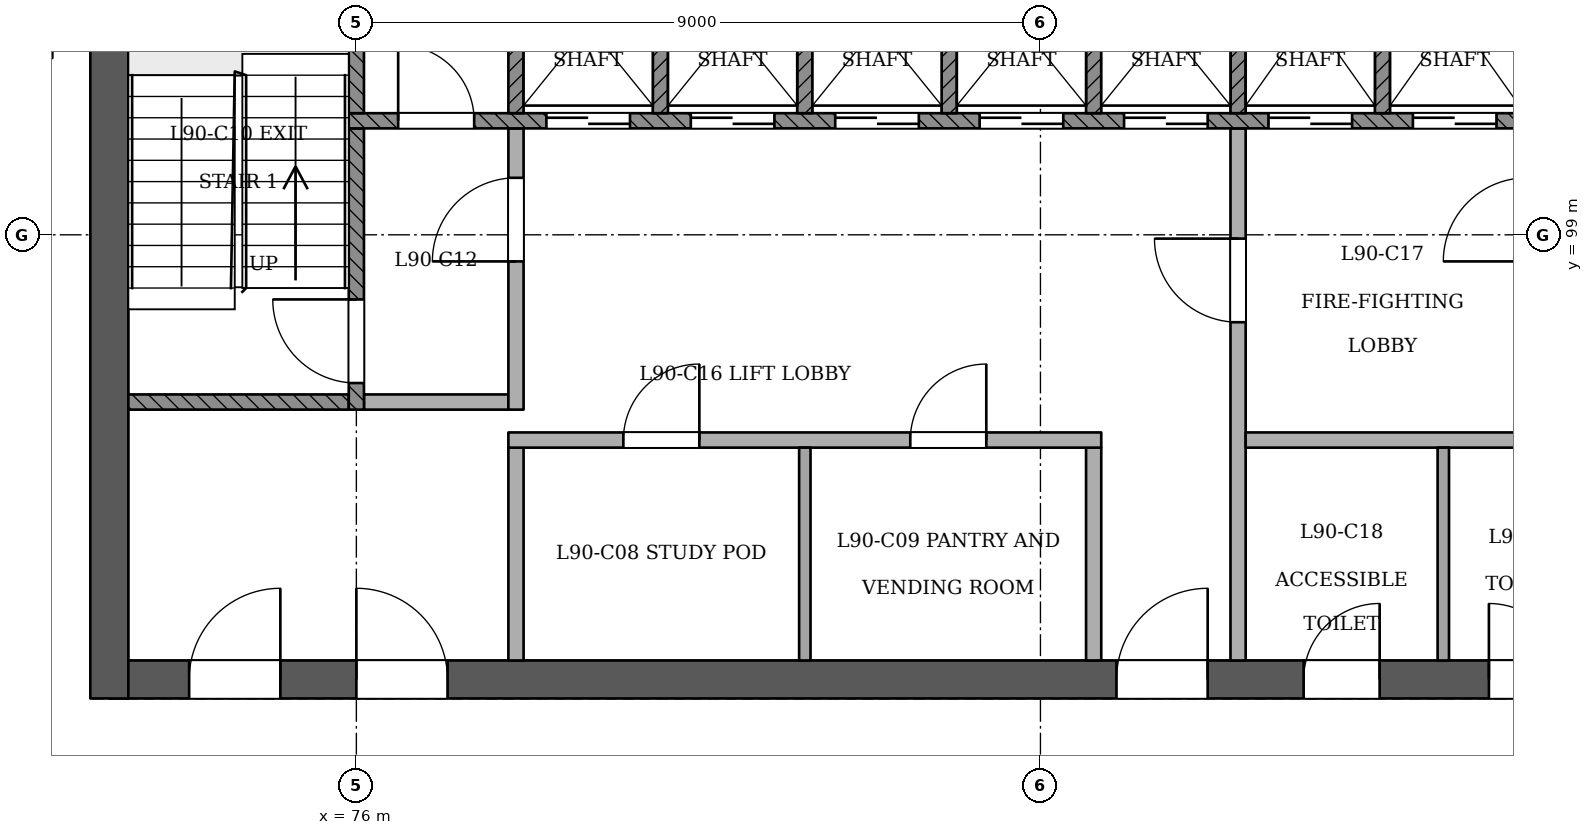
"""IFC4 building model, lengths in metres.
Left out: names, types, materials, properties, quantities, classifications, styles, units other than length and angle.
Written with IfcOpenShell. Run it as: python <this file> out.ifc"""

import sys

from ifc_helpers import new_model, si_unit, direction, frame, frame_2d, origin, place, context, subcontext, project, spatial, rectangle, extrude, element, fill, save


model = new_model("IFC4")
c1 = context("Model", 3, precision=1e-05, world=origin(), true_north=direction((0.0, 1.0)))
c2 = subcontext(c1, "Body", "Model", "MODEL_VIEW")
j1 = project(units=[si_unit("LENGTHUNIT", "METRE"), si_unit("PLANEANGLEUNIT", "RADIAN")], contexts=[c1])
p1 = place(None, origin())
s1 = spatial("IfcSite", under=j1, at=p1, CompositionType="ELEMENT")
p2 = place(p1, origin())
s2 = spatial("IfcBuilding", under=s1, at=p2, CompositionType="ELEMENT")
p3 = place(p2, frame((0.0, 0.0, 347.2)))
s3 = spatial("IfcBuildingStorey", under=s2, at=p3, CompositionType="ELEMENT", Elevation=347.2)
p4 = place(p3, frame((72.75, 93.15, 0.0), z_axis=(0.0, 0.0, 1.0), x_axis=(1.0, 0.0, 0.0)))
e1 = element("IfcWall", 1, at=p4, inside=s3, PredefinedType="SHEAR", context=c2, shape_type="SweptSolid", body=[
    extrude(rectangle(XDim=24.75, YDim=0.5, at=frame_2d((12.375, 0.0))), origin(), (0.0, 0.0, 1.0), 3.6),
])
p5 = place(p4, frame((1.05, 0.0, 0.0)))
e2 = element("IfcOpeningElement", 2, at=p5, cuts=e1, PredefinedType="OPENING", context=c2, shape_type="SweptSolid", body=[
    extrude(rectangle(XDim=1.2, YDim=2.1, at=frame_2d((0.6, 1.05))), frame((0.0, 0.26, 0.0), z_axis=(0.0, -1.0, 0.0), x_axis=(1.0, 0.0, 0.0)), (0.0, 0.0, 1.0), 0.521),
])
p6 = place(p4, frame((3.25, 0.0, 0.0)))
e3 = element("IfcOpeningElement", 3, at=p6, cuts=e1, PredefinedType="OPENING", context=c2, shape_type="SweptSolid", body=[
    extrude(rectangle(XDim=1.2, YDim=2.1, at=frame_2d((0.6, 1.05))), frame((0.0, 0.26, 0.0), z_axis=(0.0, -1.0, 0.0), x_axis=(1.0, 0.0, 0.0)), (0.0, 0.0, 1.0), 0.521),
])
p7 = place(p4, frame((13.25, 0.0, 0.0)))
e4 = element("IfcOpeningElement", 4, at=p7, cuts=e1, PredefinedType="OPENING", context=c2, shape_type="SweptSolid", body=[
    extrude(rectangle(XDim=1.2, YDim=2.1, at=frame_2d((0.6, 1.05))), frame((0.0, 0.26, 0.0), z_axis=(0.0, -1.0, 0.0), x_axis=(1.0, 0.0, 0.0)), (0.0, 0.0, 1.0), 0.521),
])
p8 = place(p4, frame((15.712, 0.0, 0.0)))
e5 = element("IfcOpeningElement", 5, at=p8, cuts=e1, PredefinedType="OPENING", context=c2, shape_type="SweptSolid", body=[
    extrude(rectangle(XDim=1.0, YDim=2.1, at=frame_2d((0.5, 1.05))), frame((0.0, 0.26, 0.0), z_axis=(0.0, -1.0, 0.0), x_axis=(1.0, 0.0, 0.0)), (0.0, 0.0, 1.0), 0.521),
])
p9 = place(p4, frame((18.15, 0.0, 0.0)))
e6 = element("IfcOpeningElement", 6, at=p9, cuts=e1, PredefinedType="OPENING", context=c2, shape_type="SweptSolid", body=[
    extrude(rectangle(XDim=1.0, YDim=2.1, at=frame_2d((0.5, 1.05))), frame((0.0, 0.26, 0.0), z_axis=(0.0, -1.0, 0.0), x_axis=(1.0, 0.0, 0.0)), (0.0, 0.0, 1.0), 0.521),
])
p10 = place(p4, frame((20.5, 0.0, 0.0)))
e7 = element("IfcOpeningElement", 7, at=p10, cuts=e1, PredefinedType="OPENING", context=c2, shape_type="SweptSolid", body=[
    extrude(rectangle(XDim=1.0, YDim=2.1, at=frame_2d((0.5, 1.05))), frame((0.0, 0.26, 0.0), z_axis=(0.0, -1.0, 0.0), x_axis=(1.0, 0.0, 0.0)), (0.0, 0.0, 1.0), 0.521),
])
p11 = place(p4, frame((22.788, 0.0, 0.0)))
e8 = element("IfcOpeningElement", 8, at=p11, cuts=e1, PredefinedType="OPENING", context=c2, shape_type="SweptSolid", body=[
    extrude(rectangle(XDim=1.0, YDim=2.1, at=frame_2d((0.5, 1.05))), frame((0.0, 0.26, 0.0), z_axis=(0.0, -1.0, 0.0), x_axis=(1.0, 0.0, 0.0)), (0.0, 0.0, 1.0), 0.521),
])
p12 = place(p3, frame((72.75, 103.65, 0.0), z_axis=(0.0, 0.0, 1.0), x_axis=(0.0, -1.0, 0.0)))
e9 = element("IfcWall", 9, at=p12, inside=s3, PredefinedType="SHEAR", context=c2, shape_type="SweptSolid", body=[
    extrude(rectangle(XDim=10.75, YDim=0.5, at=frame_2d((5.375, 0.0))), origin(), (0.0, 0.0, 1.0), 3.6),
])
p13 = place(p3, frame((78.1, 93.4, 0.0), z_axis=(0.0, 0.0, 1.0), x_axis=(0.0, 1.0, 0.0)))
e10 = element("IfcWall", 10, at=p13, inside=s3, PredefinedType="PARTITIONING", context=c2, shape_type="SweptSolid", body=[
    extrude(rectangle(XDim=2.8, YDim=0.2, at=frame_2d((1.4, 0.0))), origin(), (0.0, 0.0, 1.0), 3.2),
])
p14 = place(p3, frame((81.9, 93.4, 0.0), z_axis=(0.0, 0.0, 1.0), x_axis=(0.0, 1.0, 0.0)))
e11 = element("IfcWall", 11, at=p14, inside=s3, PredefinedType="PARTITIONING", context=c2, shape_type="SweptSolid", body=[
    extrude(rectangle(XDim=2.8, YDim=0.15, at=frame_2d((1.4, 0.0))), origin(), (0.0, 0.0, 1.0), 3.2),
])
p15 = place(p3, frame((85.7, 93.4, 0.0), z_axis=(0.0, 0.0, 1.0), x_axis=(0.0, 1.0, 0.0)))
e12 = element("IfcWall", 12, at=p15, inside=s3, PredefinedType="PARTITIONING", context=c2, shape_type="SweptSolid", body=[
    extrude(rectangle(XDim=2.8, YDim=0.2, at=frame_2d((1.4, 0.0))), origin(), (0.0, 0.0, 1.0), 3.2),
])
p16 = place(p3, frame((87.6, 93.4, 0.0), z_axis=(0.0, 0.0, 1.0), x_axis=(0.0, 1.0, 0.0)))
e13 = element("IfcWall", 13, at=p16, inside=s3, PredefinedType="PARTITIONING", context=c2, shape_type="SweptSolid", body=[
    extrude(rectangle(XDim=7.0, YDim=0.2, at=frame_2d((3.5, 0.0))), origin(), (0.0, 0.0, 1.0), 3.2),
])
p17 = place(p16, frame((4.45, 0.0, 0.0)))
e14 = element("IfcOpeningElement", 14, at=p17, cuts=e13, PredefinedType="OPENING", context=c2, shape_type="SweptSolid", body=[
    extrude(rectangle(XDim=1.1, YDim=2.1, at=frame_2d((0.55, 1.05))), frame((0.0, 0.11, 0.0), z_axis=(0.0, -1.0, 0.0), x_axis=(1.0, 0.0, 0.0)), (0.0, 0.0, 1.0), 0.221),
])
p18 = place(p3, frame((90.3, 93.4, 0.0), z_axis=(0.0, 0.0, 1.0), x_axis=(0.0, 1.0, 0.0)))
e15 = element("IfcWall", 15, at=p18, inside=s3, PredefinedType="PARTITIONING", context=c2, shape_type="SweptSolid", body=[
    extrude(rectangle(XDim=2.8, YDim=0.15, at=frame_2d((1.4, 0.0))), origin(), (0.0, 0.0, 1.0), 3.2),
])
p19 = place(p3, frame((78.0, 96.3, 0.0), z_axis=(0.0, 0.0, 1.0), x_axis=(1.0, 0.0, 0.0)))
e16 = element("IfcWall", 16, at=p19, inside=s3, PredefinedType="PARTITIONING", context=c2, shape_type="SweptSolid", body=[
    extrude(rectangle(XDim=7.8, YDim=0.2, at=frame_2d((3.9, 0.0))), origin(), (0.0, 0.0, 1.0), 3.2),
])
p20 = place(p19, frame((1.512, 0.0, 0.0)))
e17 = element("IfcOpeningElement", 17, at=p20, cuts=e16, PredefinedType="OPENING", context=c2, shape_type="SweptSolid", body=[
    extrude(rectangle(XDim=1.0, YDim=2.1, at=frame_2d((0.5, 1.05))), frame((0.0, 0.11, 0.0), z_axis=(0.0, -1.0, 0.0), x_axis=(1.0, 0.0, 0.0)), (0.0, 0.0, 1.0), 0.221),
])
p21 = place(p19, frame((5.288, 0.0, 0.0)))
e18 = element("IfcOpeningElement", 18, at=p21, cuts=e16, PredefinedType="OPENING", context=c2, shape_type="SweptSolid", body=[
    extrude(rectangle(XDim=1.0, YDim=2.1, at=frame_2d((0.5, 1.05))), frame((0.0, 0.11, 0.0), z_axis=(0.0, -1.0, 0.0), x_axis=(1.0, 0.0, 0.0)), (0.0, 0.0, 1.0), 0.221),
])
p22 = place(p3, frame((87.7, 96.3, 0.0), z_axis=(0.0, 0.0, 1.0), x_axis=(1.0, 0.0, 0.0)))
e19 = element("IfcWall", 19, at=p22, inside=s3, PredefinedType="PARTITIONING", context=c2, shape_type="SweptSolid", body=[
    extrude(rectangle(XDim=3.6, YDim=0.2, at=frame_2d((1.8, 0.0))), origin(), (0.0, 0.0, 1.0), 3.2),
])
p23 = place(p3, frame((73.0, 96.8, 0.0), z_axis=(0.0, 0.0, 1.0), x_axis=(1.0, 0.0, 0.0)))
e20 = element("IfcWall", 20, at=p23, inside=s3, PredefinedType="SOLIDWALL", context=c2, shape_type="SweptSolid", body=[
    extrude(rectangle(XDim=2.9, YDim=0.2, at=frame_2d((1.45, 0.0))), origin(), (0.0, 0.0, 1.0), 3.2),
])
p24 = place(p3, frame((76.0, 96.7, 0.0), z_axis=(0.0, 0.0, 1.0), x_axis=(0.0, 1.0, 0.0)))
e21 = element("IfcWall", 21, at=p24, inside=s3, PredefinedType="SOLIDWALL", context=c2, shape_type="SweptSolid", body=[
    extrude(rectangle(XDim=3.7, YDim=0.2, at=frame_2d((1.85, 0.0))), origin(), (0.0, 0.0, 1.0), 3.2),
])
p25 = place(p24, frame((0.35, 0.0, 0.0)))
e22 = element("IfcOpeningElement", 22, at=p25, cuts=e21, PredefinedType="OPENING", context=c2, shape_type="SweptSolid", body=[
    extrude(rectangle(XDim=1.1, YDim=2.1, at=frame_2d((0.55, 1.05))), frame((0.0, 0.11, 0.0), z_axis=(0.0, -1.0, 0.0), x_axis=(1.0, 0.0, 0.0)), (0.0, 0.0, 1.0), 0.221),
])
p26 = place(p3, frame((76.1, 96.8, 0.0), z_axis=(0.0, 0.0, 1.0), x_axis=(1.0, 0.0, 0.0)))
e23 = element("IfcWall", 23, at=p26, inside=s3, PredefinedType="PARTITIONING", context=c2, shape_type="SweptSolid", body=[
    extrude(rectangle(XDim=1.9, YDim=0.2, at=frame_2d((0.95, 0.0))), origin(), (0.0, 0.0, 1.0), 3.2),
])
p27 = place(p3, frame((78.1, 96.7, 0.0), z_axis=(0.0, 0.0, 1.0), x_axis=(0.0, 1.0, 0.0)))
e24 = element("IfcWall", 24, at=p27, inside=s3, PredefinedType="PARTITIONING", context=c2, shape_type="SweptSolid", body=[
    extrude(rectangle(XDim=3.7, YDim=0.2, at=frame_2d((1.85, 0.0))), origin(), (0.0, 0.0, 1.0), 3.2),
])
p28 = place(p27, frame((1.95, 0.0, 0.0)))
e25 = element("IfcOpeningElement", 25, at=p28, cuts=e24, PredefinedType="OPENING", context=c2, shape_type="SweptSolid", body=[
    extrude(rectangle(XDim=1.1, YDim=2.1, at=frame_2d((0.55, 1.05))), frame((0.0, 0.11, 0.0), z_axis=(0.0, -1.0, 0.0), x_axis=(1.0, 0.0, 0.0)), (0.0, 0.0, 1.0), 0.221),
])
p29 = place(p3, frame((75.9, 100.5, 0.0), z_axis=(0.0, 0.0, 1.0), x_axis=(1.0, 0.0, 0.0)))
e26 = element("IfcWall", 26, at=p29, inside=s3, PredefinedType="SOLIDWALL", context=c2, shape_type="SweptSolid", body=[
    extrude(rectangle(XDim=18.2, YDim=0.2, at=frame_2d((9.1, 0.0))), origin(), (0.0, 0.0, 1.0), 3.2),
])
p30 = place(p29, frame((2.6, 0.0, 0.0)))
e27 = element("IfcOpeningElement", 27, at=p30, cuts=e26, PredefinedType="OPENING", context=c2, shape_type="SweptSolid", body=[
    extrude(rectangle(XDim=1.1, YDim=2.1, at=frame_2d((0.55, 1.05))), frame((0.0, 0.11, 0.0), z_axis=(0.0, -1.0, 0.0), x_axis=(1.0, 0.0, 0.0)), (0.0, 0.0, 1.0), 0.221),
])
p31 = place(p29, frame((4.5, 0.0, 0.0)))
e28 = element("IfcOpeningElement", 28, at=p31, cuts=e26, PredefinedType="OPENING", context=c2, shape_type="SweptSolid", body=[
    extrude(rectangle(XDim=1.1, YDim=2.1, at=frame_2d((0.55, 1.05))), frame((0.0, 0.11, 0.0), z_axis=(0.0, -1.0, 0.0), x_axis=(1.0, 0.0, 0.0)), (0.0, 0.0, 1.0), 0.221),
])
p32 = place(p29, frame((6.4, 0.0, 0.0)))
e29 = element("IfcOpeningElement", 29, at=p32, cuts=e26, PredefinedType="OPENING", context=c2, shape_type="SweptSolid", body=[
    extrude(rectangle(XDim=1.1, YDim=2.1, at=frame_2d((0.55, 1.05))), frame((0.0, 0.11, 0.0), z_axis=(0.0, -1.0, 0.0), x_axis=(1.0, 0.0, 0.0)), (0.0, 0.0, 1.0), 0.221),
])
p33 = place(p29, frame((8.3, 0.0, 0.0)))
e30 = element("IfcOpeningElement", 30, at=p33, cuts=e26, PredefinedType="OPENING", context=c2, shape_type="SweptSolid", body=[
    extrude(rectangle(XDim=1.1, YDim=2.1, at=frame_2d((0.55, 1.05))), frame((0.0, 0.11, 0.0), z_axis=(0.0, -1.0, 0.0), x_axis=(1.0, 0.0, 0.0)), (0.0, 0.0, 1.0), 0.221),
])
p34 = place(p29, frame((10.2, 0.0, 0.0)))
e31 = element("IfcOpeningElement", 31, at=p34, cuts=e26, PredefinedType="OPENING", context=c2, shape_type="SweptSolid", body=[
    extrude(rectangle(XDim=1.1, YDim=2.1, at=frame_2d((0.55, 1.05))), frame((0.0, 0.11, 0.0), z_axis=(0.0, -1.0, 0.0), x_axis=(1.0, 0.0, 0.0)), (0.0, 0.0, 1.0), 0.221),
])
p35 = place(p29, frame((12.1, 0.0, 0.0)))
e32 = element("IfcOpeningElement", 32, at=p35, cuts=e26, PredefinedType="OPENING", context=c2, shape_type="SweptSolid", body=[
    extrude(rectangle(XDim=1.1, YDim=2.1, at=frame_2d((0.55, 1.05))), frame((0.0, 0.11, 0.0), z_axis=(0.0, -1.0, 0.0), x_axis=(1.0, 0.0, 0.0)), (0.0, 0.0, 1.0), 0.221),
])
p36 = place(p29, frame((14.0, 0.0, 0.0)))
e33 = element("IfcOpeningElement", 33, at=p36, cuts=e26, PredefinedType="OPENING", context=c2, shape_type="SweptSolid", body=[
    extrude(rectangle(XDim=1.1, YDim=2.1, at=frame_2d((0.55, 1.05))), frame((0.0, 0.11, 0.0), z_axis=(0.0, -1.0, 0.0), x_axis=(1.0, 0.0, 0.0)), (0.0, 0.0, 1.0), 0.221),
])
p37 = place(p29, frame((0.65, 0.0, 0.0)))
e34 = element("IfcOpeningElement", 34, at=p37, cuts=e26, PredefinedType="OPENING", context=c2, shape_type="SweptSolid", body=[
    extrude(rectangle(XDim=1.0, YDim=2.1, at=frame_2d((0.5, 1.05))), frame((0.0, 0.11, 0.0), z_axis=(0.0, -1.0, 0.0), x_axis=(1.0, 0.0, 0.0)), (0.0, 0.0, 1.0), 0.221),
])
p38 = place(p29, frame((16.3, 0.0, 0.0)))
e35 = element("IfcOpeningElement", 35, at=p38, cuts=e26, PredefinedType="OPENING", context=c2, shape_type="SweptSolid", body=[
    extrude(rectangle(XDim=1.0, YDim=2.1, at=frame_2d((0.5, 1.05))), frame((0.0, 0.11, 0.0), z_axis=(0.0, -1.0, 0.0), x_axis=(1.0, 0.0, 0.0)), (0.0, 0.0, 1.0), 0.221),
])
for number, where, z_axis, x_axis in (
    (36, (76.0, 100.6, 0.0), (0.0, 0.0, 1.0), (0.0, 1.0, 0.0)),
    (37, (78.1, 100.6, 0.0), (0.0, 0.0, 1.0), (0.0, 1.0, 0.0)),
    (38, (80.0, 100.6, 0.0), (0.0, 0.0, 1.0), (0.0, 1.0, 0.0)),
    (39, (81.9, 100.6, 0.0), (0.0, 0.0, 1.0), (0.0, 1.0, 0.0)),
    (40, (83.8, 100.6, 0.0), (0.0, 0.0, 1.0), (0.0, 1.0, 0.0)),
    (41, (85.7, 100.6, 0.0), (0.0, 0.0, 1.0), (0.0, 1.0, 0.0)),
    (42, (87.6, 100.6, 0.0), (0.0, 0.0, 1.0), (0.0, 1.0, 0.0)),
    (43, (89.5, 100.6, 0.0), (0.0, 0.0, 1.0), (0.0, 1.0, 0.0)),
):
    element("IfcWall", number, at=place(p3, frame(where, z_axis=z_axis, x_axis=x_axis)), inside=s3, PredefinedType="SOLIDWALL", context=c2, shape_type="SweptSolid", body=[
        extrude(rectangle(XDim=2.8, YDim=0.2, at=frame_2d((1.4, 0.0))), origin(), (0.0, 0.0, 1.0), 3.2),
    ])
p39 = place(p30, origin())
e44 = element("IfcDoor", 44, at=p39, inside=s3, OperationType="SLIDING_TO_RIGHT", PredefinedType="NOTDEFINED", context=c2, shape_type="SweptSolid", body=[
    extrude(rectangle(XDim=1.1, YDim=2.1, at=frame_2d((0.55, 1.05))), frame((0.0, 0.025, 0.0), z_axis=(0.0, -1.0, 0.0), x_axis=(1.0, 0.0, 0.0)), (0.0, 0.0, 1.0), 0.05),
])
fill(e27, e44)
p40 = place(p31, origin())
e45 = element("IfcDoor", 45, at=p40, inside=s3, OperationType="SLIDING_TO_LEFT", PredefinedType="NOTDEFINED", context=c2, shape_type="SweptSolid", body=[
    extrude(rectangle(XDim=1.1, YDim=2.1, at=frame_2d((0.55, 1.05))), frame((0.0, 0.025, 0.0), z_axis=(0.0, -1.0, 0.0), x_axis=(1.0, 0.0, 0.0)), (0.0, 0.0, 1.0), 0.05),
])
fill(e28, e45)
p41 = place(p32, origin())
e46 = element("IfcDoor", 46, at=p41, inside=s3, OperationType="SLIDING_TO_RIGHT", PredefinedType="NOTDEFINED", context=c2, shape_type="SweptSolid", body=[
    extrude(rectangle(XDim=1.1, YDim=2.1, at=frame_2d((0.55, 1.05))), frame((0.0, 0.025, 0.0), z_axis=(0.0, -1.0, 0.0), x_axis=(1.0, 0.0, 0.0)), (0.0, 0.0, 1.0), 0.05),
])
fill(e29, e46)
p42 = place(p33, origin())
e47 = element("IfcDoor", 47, at=p42, inside=s3, OperationType="SLIDING_TO_LEFT", PredefinedType="NOTDEFINED", context=c2, shape_type="SweptSolid", body=[
    extrude(rectangle(XDim=1.1, YDim=2.1, at=frame_2d((0.55, 1.05))), frame((0.0, 0.025, 0.0), z_axis=(0.0, -1.0, 0.0), x_axis=(1.0, 0.0, 0.0)), (0.0, 0.0, 1.0), 0.05),
])
fill(e30, e47)
p43 = place(p34, origin())
e48 = element("IfcDoor", 48, at=p43, inside=s3, OperationType="SLIDING_TO_RIGHT", PredefinedType="NOTDEFINED", context=c2, shape_type="SweptSolid", body=[
    extrude(rectangle(XDim=1.1, YDim=2.1, at=frame_2d((0.55, 1.05))), frame((0.0, 0.025, 0.0), z_axis=(0.0, -1.0, 0.0), x_axis=(1.0, 0.0, 0.0)), (0.0, 0.0, 1.0), 0.05),
])
fill(e31, e48)
p44 = place(p35, origin())
e49 = element("IfcDoor", 49, at=p44, inside=s3, OperationType="SLIDING_TO_RIGHT", PredefinedType="NOTDEFINED", context=c2, shape_type="SweptSolid", body=[
    extrude(rectangle(XDim=1.1, YDim=2.1, at=frame_2d((0.55, 1.05))), frame((0.0, 0.025, 0.0), z_axis=(0.0, -1.0, 0.0), x_axis=(1.0, 0.0, 0.0)), (0.0, 0.0, 1.0), 0.05),
])
fill(e32, e49)
p45 = place(p36, origin())
e50 = element("IfcDoor", 50, at=p45, inside=s3, OperationType="SLIDING_TO_LEFT", PredefinedType="NOTDEFINED", context=c2, shape_type="SweptSolid", body=[
    extrude(rectangle(XDim=1.1, YDim=2.1, at=frame_2d((0.55, 1.05))), frame((0.0, 0.025, 0.0), z_axis=(0.0, -1.0, 0.0), x_axis=(1.0, 0.0, 0.0)), (0.0, 0.0, 1.0), 0.05),
])
fill(e33, e50)
p46 = place(p25, origin())
e51 = element("IfcDoor", 51, at=p46, inside=s3, OperationType="SINGLE_SWING_RIGHT", PredefinedType="NOTDEFINED", context=c2, shape_type="SweptSolid", body=[
    extrude(rectangle(XDim=1.1, YDim=2.1, at=frame_2d((0.55, 1.05))), frame((0.0, 0.025, 0.0), z_axis=(0.0, -1.0, 0.0), x_axis=(1.0, 0.0, 0.0)), (0.0, 0.0, 1.0), 0.05),
])
fill(e22, e51)
p47 = place(p28, origin())
e52 = element("IfcDoor", 52, at=p47, inside=s3, OperationType="SINGLE_SWING_LEFT", PredefinedType="NOTDEFINED", context=c2, shape_type="SweptSolid", body=[
    extrude(rectangle(XDim=1.1, YDim=2.1, at=frame_2d((0.55, 1.05))), frame((0.0, 0.025, 0.0), z_axis=(0.0, -1.0, 0.0), x_axis=(1.0, 0.0, 0.0)), (0.0, 0.0, 1.0), 0.05),
])
fill(e25, e52)
p48 = place(p17, origin())
e53 = element("IfcDoor", 53, at=p48, inside=s3, OperationType="SINGLE_SWING_RIGHT", PredefinedType="NOTDEFINED", context=c2, shape_type="SweptSolid", body=[
    extrude(rectangle(XDim=1.1, YDim=2.1, at=frame_2d((0.55, 1.05))), frame((0.0, 0.025, 0.0), z_axis=(0.0, -1.0, 0.0), x_axis=(1.0, 0.0, 0.0)), (0.0, 0.0, 1.0), 0.05),
])
fill(e14, e53)
p49 = place(p5, origin())
e54 = element("IfcDoor", 54, at=p49, inside=s3, OperationType="SINGLE_SWING_RIGHT", PredefinedType="NOTDEFINED", context=c2, shape_type="SweptSolid", body=[
    extrude(rectangle(XDim=1.2, YDim=2.1, at=frame_2d((0.6, 1.05))), frame((0.0, 0.025, 0.0), z_axis=(0.0, -1.0, 0.0), x_axis=(1.0, 0.0, 0.0)), (0.0, 0.0, 1.0), 0.05),
])
fill(e2, e54)
p50 = place(p6, origin())
e55 = element("IfcDoor", 55, at=p50, inside=s3, OperationType="SINGLE_SWING_LEFT", PredefinedType="NOTDEFINED", context=c2, shape_type="SweptSolid", body=[
    extrude(rectangle(XDim=1.2, YDim=2.1, at=frame_2d((0.6, 1.05))), frame((0.0, 0.025, 0.0), z_axis=(0.0, -1.0, 0.0), x_axis=(1.0, 0.0, 0.0)), (0.0, 0.0, 1.0), 0.05),
])
fill(e3, e55)
p51 = place(p7, origin())
e56 = element("IfcDoor", 56, at=p51, inside=s3, OperationType="SINGLE_SWING_RIGHT", PredefinedType="NOTDEFINED", context=c2, shape_type="SweptSolid", body=[
    extrude(rectangle(XDim=1.2, YDim=2.1, at=frame_2d((0.6, 1.05))), frame((0.0, 0.025, 0.0), z_axis=(0.0, -1.0, 0.0), x_axis=(1.0, 0.0, 0.0)), (0.0, 0.0, 1.0), 0.05),
])
fill(e4, e56)
p52 = place(p37, origin())
e57 = element("IfcDoor", 57, at=p52, inside=s3, OperationType="SINGLE_SWING_LEFT", PredefinedType="NOTDEFINED", context=c2, shape_type="SweptSolid", body=[
    extrude(rectangle(XDim=1.0, YDim=2.1, at=frame_2d((0.5, 1.05))), frame((0.0, 0.025, 0.0), z_axis=(0.0, -1.0, 0.0), x_axis=(1.0, 0.0, 0.0)), (0.0, 0.0, 1.0), 0.05),
])
fill(e34, e57)
p53 = place(p8, origin())
e58 = element("IfcDoor", 58, at=p53, inside=s3, OperationType="SINGLE_SWING_RIGHT", PredefinedType="NOTDEFINED", context=c2, shape_type="SweptSolid", body=[
    extrude(rectangle(XDim=1.0, YDim=2.1, at=frame_2d((0.5, 1.05))), frame((0.0, 0.025, 0.0), z_axis=(0.0, -1.0, 0.0), x_axis=(1.0, 0.0, 0.0)), (0.0, 0.0, 1.0), 0.05),
])
fill(e5, e58)
p54 = place(p9, origin())
e59 = element("IfcDoor", 59, at=p54, inside=s3, OperationType="SINGLE_SWING_LEFT", PredefinedType="NOTDEFINED", context=c2, shape_type="SweptSolid", body=[
    extrude(rectangle(XDim=1.0, YDim=2.1, at=frame_2d((0.5, 1.05))), frame((0.0, 0.025, 0.0), z_axis=(0.0, -1.0, 0.0), x_axis=(1.0, 0.0, 0.0)), (0.0, 0.0, 1.0), 0.05),
])
fill(e6, e59)
p55 = place(p20, origin())
e60 = element("IfcDoor", 60, at=p55, inside=s3, OperationType="SINGLE_SWING_RIGHT", PredefinedType="NOTDEFINED", context=c2, shape_type="SweptSolid", body=[
    extrude(rectangle(XDim=1.0, YDim=2.1, at=frame_2d((0.5, 1.05))), frame((0.0, 0.025, 0.0), z_axis=(0.0, -1.0, 0.0), x_axis=(1.0, 0.0, 0.0)), (0.0, 0.0, 1.0), 0.05),
])
fill(e17, e60)
p56 = place(p21, origin())
e61 = element("IfcDoor", 61, at=p56, inside=s3, OperationType="SINGLE_SWING_RIGHT", PredefinedType="NOTDEFINED", context=c2, shape_type="SweptSolid", body=[
    extrude(rectangle(XDim=1.0, YDim=2.1, at=frame_2d((0.5, 1.05))), frame((0.0, 0.025, 0.0), z_axis=(0.0, -1.0, 0.0), x_axis=(1.0, 0.0, 0.0)), (0.0, 0.0, 1.0), 0.05),
])
fill(e18, e61)
save(model, sys.argv[1])
